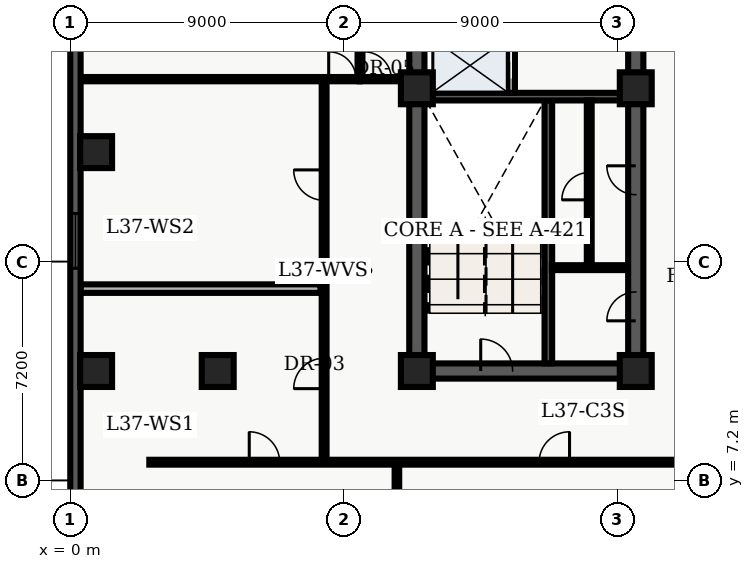
"""IFC4 building model, lengths in metres.
Left out: names, types, materials, properties, quantities, classifications, styles, units other than length and angle.
Written with IfcOpenShell. Run it as: python <this file> out.ifc"""

import sys

from ifc_helpers import new_model, entity, si_unit, converted_unit, direction, frame, origin_with_axes, origin_2d_with_axis, place, context, subcontext, project, spatial, polyline, rectangle, outline, extrude, element, fill, save


model = new_model("IFC4")
c1 = context("Model", 3, precision=1e-05, world=origin_with_axes(), true_north=direction((0.0, 1.0)))
c2 = subcontext(c1, "Body", "Model", "MODEL_VIEW")
j1 = project(units=[si_unit("LENGTHUNIT", "METRE"), converted_unit("PLANEANGLEUNIT", "DEGREE", entity("IfcPlaneAngleMeasure", 0.017), si_unit("PLANEANGLEUNIT", "RADIAN"), dimensions=[0, 0, 0, 0, 0, 0, 0])], contexts=[c1])
p1 = place(None, origin_with_axes())
s1 = spatial("IfcSite", under=j1, at=p1, CompositionType="ELEMENT")
p2 = place(p1, origin_with_axes())
s2 = spatial("IfcBuilding", under=s1, at=p2, CompositionType="ELEMENT")
p3 = place(p2, frame((0.0, 0.0, 152.4), z_axis=(0.0, 0.0, 1.0), x_axis=(1.0, 0.0, 0.0)))
s3 = spatial("IfcBuildingStorey", under=s2, at=p3, CompositionType="ELEMENT", Elevation=152.4)
p4 = place(p3, frame((11.4, 10.8, 0.0), z_axis=(0.0, 0.0, 1.0), x_axis=(0.0, 1.0, 0.0)))
e1 = element("IfcWall", 1, at=p4, inside=s3, PredefinedType="SHEAR", context=c2, shape_type="SweptSolid", body=[
    extrude(outline(polyline([(0.0, -0.25), (27.0, -0.25), (27.0, 0.25), (0.0, 0.25), (0.0, -0.25)])), origin_with_axes(), (0.0, 0.0, 1.0), 3.66),
])
p5 = place(p3, frame((11.4, 10.8, 0.0), z_axis=(0.0, 0.0, 1.0), x_axis=(1.0, 0.0, 0.0)))
e2 = element("IfcWall", 2, at=p5, inside=s3, PredefinedType="SHEAR", context=c2, shape_type="SweptSolid", body=[
    extrude(outline(polyline([(0.0, -0.25), (7.2, -0.25), (7.2, 0.25), (0.0, 0.25), (0.0, -0.25)])), origin_with_axes(), (0.0, 0.0, 1.0), 3.66),
])
p6 = place(p5, frame((2.625, 0.0, 0.0), z_axis=(0.0, 0.0, 1.0), x_axis=(1.0, 0.0, 0.0)))
e3 = element("IfcOpeningElement", 3, at=p6, cuts=e2, PredefinedType="OPENING", context=c2, shape_type="SweptSolid", body=[
    extrude(rectangle(XDim=1.05, YDim=0.52, at=origin_2d_with_axis()), origin_with_axes(), (0.0, 0.0, 1.0), 2.15),
])
p7 = place(p3, frame((18.6, 10.8, 0.0), z_axis=(0.0, 0.0, 1.0), x_axis=(0.0, 1.0, 0.0)))
e4 = element("IfcWall", 4, at=p7, inside=s3, PredefinedType="SHEAR", context=c2, shape_type="SweptSolid", body=[
    extrude(outline(polyline([(0.0, -0.25), (13.5, -0.25), (13.5, 0.25), (0.0, 0.25), (0.0, -0.25)])), origin_with_axes(), (0.0, 0.0, 1.0), 3.66),
])
p8 = place(p7, frame((11.125, 0.0, 0.0), z_axis=(0.0, 0.0, 1.0), x_axis=(1.0, 0.0, 0.0)))
e5 = element("IfcOpeningElement", 5, at=p8, cuts=e4, PredefinedType="OPENING", context=c2, shape_type="SweptSolid", body=[
    extrude(rectangle(XDim=1.05, YDim=0.52, at=origin_2d_with_axis()), origin_with_axes(), (0.0, 0.0, 1.0), 2.15),
])
p9 = place(p7, frame((2.125, 0.0, 0.0), z_axis=(0.0, 0.0, 1.0), x_axis=(1.0, 0.0, 0.0)))
e6 = element("IfcOpeningElement", 6, at=p9, cuts=e4, PredefinedType="OPENING", context=c2, shape_type="SweptSolid", body=[
    extrude(rectangle(XDim=0.95, YDim=0.52, at=origin_2d_with_axis()), origin_with_axes(), (0.0, 0.0, 1.0), 2.15),
])
p10 = place(p7, frame((6.275, 0.0, 0.0), z_axis=(0.0, 0.0, 1.0), x_axis=(1.0, 0.0, 0.0)))
e7 = element("IfcOpeningElement", 7, at=p10, cuts=e4, PredefinedType="OPENING", context=c2, shape_type="SweptSolid", body=[
    extrude(rectangle(XDim=0.95, YDim=0.52, at=origin_2d_with_axis()), origin_with_axes(), (0.0, 0.0, 1.0), 2.15),
])
p11 = place(p3, frame((15.725, 11.05, 0.0), z_axis=(0.0, 0.0, 1.0), x_axis=(0.0, 1.0, 0.0)))
e8 = element("IfcWall", 8, at=p11, inside=s3, PredefinedType="SHEAR", context=c2, shape_type="SweptSolid", body=[
    extrude(outline(polyline([(0.0, -0.125), (8.65, -0.125), (8.65, 0.125), (0.0, 0.125), (0.0, -0.125)])), origin_with_axes(), (0.0, 0.0, 1.0), 3.66),
])
p12 = place(p3, frame((11.65, 19.825, 0.0), z_axis=(0.0, 0.0, 1.0), x_axis=(1.0, 0.0, 0.0)))
e9 = element("IfcWall", 9, at=p12, inside=s3, PredefinedType="SHEAR", context=c2, shape_type="SweptSolid", body=[
    extrude(outline(polyline([(0.0, -0.125), (6.7, -0.125), (6.7, 0.125), (0.0, 0.125), (0.0, -0.125)])), origin_with_axes(), (0.0, 0.0, 1.0), 3.66),
])
p13 = place(p3, frame((14.5, 19.95, 0.0), z_axis=(0.0, 0.0, 1.0), x_axis=(0.0, 1.0, 0.0)))
e10 = element("IfcWall", 10, at=p13, inside=s3, PredefinedType="SOLIDWALL", context=c2, shape_type="SweptSolid", body=[
    extrude(outline(polyline([(0.0, -0.125), (6.25, -0.125), (6.25, 0.125), (0.0, 0.125), (0.0, -0.125)])), origin_with_axes(), (0.0, 0.0, 1.0), 2.7),
])
p14 = place(p13, frame((1.025, 0.0, 0.0), z_axis=(0.0, 0.0, 1.0), x_axis=(1.0, 0.0, 0.0)))
e11 = element("IfcOpeningElement", 11, at=p14, cuts=e10, PredefinedType="OPENING", context=c2, shape_type="SweptSolid", body=[
    extrude(rectangle(XDim=1.1, YDim=0.27, at=origin_2d_with_axis()), origin_with_axes(), (0.0, 0.0, 1.0), 2.15),
])
p15 = place(p13, frame((2.975, 0.0, 0.0), z_axis=(0.0, 0.0, 1.0), x_axis=(1.0, 0.0, 0.0)))
e12 = element("IfcOpeningElement", 12, at=p15, cuts=e10, PredefinedType="OPENING", context=c2, shape_type="SweptSolid", body=[
    extrude(rectangle(XDim=1.1, YDim=0.27, at=origin_2d_with_axis()), origin_with_axes(), (0.0, 0.0, 1.0), 2.15),
])
p16 = place(p13, frame((5.425, 0.0, 0.0), z_axis=(0.0, 0.0, 1.0), x_axis=(1.0, 0.0, 0.0)))
e13 = element("IfcOpeningElement", 13, at=p16, cuts=e10, PredefinedType="OPENING", context=c2, shape_type="SweptSolid", body=[
    extrude(rectangle(XDim=1.2, YDim=0.27, at=origin_2d_with_axis()), origin_with_axes(), (0.0, 0.0, 1.0), 2.15),
])
for number, where, z_axis, x_axis in (
    (14, (11.4, 10.8, 0.0), (0.0, 0.0, 1.0), (1.0, 0.0, 0.0)),
    (15, (11.4, 20.1, 0.0), (0.0, 0.0, 1.0), (1.0, 0.0, 0.0)),
    (16, (18.6, 10.8, 0.0), (0.0, 0.0, 1.0), (1.0, 0.0, 0.0)),
    (17, (18.6, 20.1, 0.0), (0.0, 0.0, 1.0), (1.0, 0.0, 0.0)),
    (18, (4.85, 10.8, 0.0), (0.0, 0.0, 1.0), (1.0, 0.0, 0.0)),
    (19, (0.85, 10.8, 0.0), (0.0, 0.0, 1.0), (1.0, 0.0, 0.0)),
    (20, (0.85, 18.0, 0.0), (0.0, 0.0, 1.0), (1.0, 0.0, 0.0)),
):
    element("IfcColumn", number, at=place(p3, frame(where, z_axis=z_axis, x_axis=x_axis)), inside=s3, PredefinedType="COLUMN", context=c2, shape_type="SweptSolid", body=[
        extrude(rectangle(XDim=1.05, YDim=1.05, at=origin_2d_with_axis()), origin_with_axes(), (0.0, 0.0, 1.0), 3.9),
    ])
p17 = place(p3, frame((15.84, 14.2, 0.0), z_axis=(0.0, 0.0, 1.0), x_axis=(1.0, 0.0, 0.0)))
e21 = element("IfcWall", 21, at=p17, inside=s3, PredefinedType="PARTITIONING", context=c2, shape_type="SweptSolid", body=[
    extrude(outline(polyline([(0.0, -0.08), (2.46, -0.08), (2.46, 0.08), (0.0, 0.08), (0.0, -0.08)])), origin_with_axes(), (0.0, 0.0, 1.0), 2.7),
])
p18 = place(p3, frame((17.07, 14.28, 0.0), z_axis=(0.0, 0.0, 1.0), x_axis=(0.0, 1.0, 0.0)))
e22 = element("IfcWall", 22, at=p18, inside=s3, PredefinedType="PARTITIONING", context=c2, shape_type="SweptSolid", body=[
    extrude(outline(polyline([(0.0, -0.08), (5.42, -0.08), (5.42, 0.08), (0.0, 0.08), (0.0, -0.08)])), origin_with_axes(), (0.0, 0.0, 1.0), 2.7),
])
p19 = place(p18, frame((2.6, 0.0, 0.0), z_axis=(0.0, 0.0, 1.0), x_axis=(1.0, 0.0, 0.0)))
e23 = element("IfcOpeningElement", 23, at=p19, cuts=e22, PredefinedType="OPENING", context=c2, shape_type="SweptSolid", body=[
    extrude(rectangle(XDim=0.9, YDim=0.18, at=origin_2d_with_axis()), origin_with_axes(), (0.0, 0.0, 1.0), 2.15),
])
p20 = place(p3, frame((9.52, 20.4, 0.0), z_axis=(0.0, 0.0, 1.0), x_axis=(0.0, 1.0, 0.0)))
e24 = element("IfcWall", 24, at=p20, inside=s3, PredefinedType="PARTITIONING", context=c2, shape_type="SweptSolid", body=[
    extrude(outline(polyline([(0.0, -0.07), (4.0, -0.07), (4.0, 0.07), (0.0, 0.07), (0.0, -0.07)])), origin_with_axes(), (0.0, 0.0, 1.0), 2.7),
])
p21 = place(p3, frame((9.52, 20.4, 0.0), z_axis=(0.0, 0.0, 1.0), x_axis=(1.0, 0.0, 0.0)))
e25 = element("IfcWall", 25, at=p21, inside=s3, PredefinedType="PARTITIONING", context=c2, shape_type="SweptSolid", body=[
    extrude(outline(polyline([(0.0, -0.07), (1.58, -0.07), (1.58, 0.07), (0.0, 0.07), (0.0, -0.07)])), origin_with_axes(), (0.0, 0.0, 1.0), 2.7),
])
p22 = place(p21, frame((0.59, 0.0, 0.0), z_axis=(0.0, 0.0, 1.0), x_axis=(1.0, 0.0, 0.0)))
e26 = element("IfcOpeningElement", 26, at=p22, cuts=e25, PredefinedType="OPENING", context=c2, shape_type="SweptSolid", body=[
    extrude(rectangle(XDim=0.9, YDim=0.16, at=origin_2d_with_axis()), origin_with_axes(), (0.0, 0.0, 1.0), 2.15),
])
p23 = place(p3, frame((2.6, 7.8, 0.0), z_axis=(0.0, 0.0, 1.0), x_axis=(1.0, 0.0, 0.0)))
e27 = element("IfcWall", 27, at=p23, inside=s3, PredefinedType="PARTITIONING", context=c2, shape_type="SweptSolid", body=[
    extrude(outline(polyline([(0.0, -0.08), (18.55, -0.08), (18.55, 0.08), (0.0, 0.08), (0.0, -0.08)])), origin_with_axes(), (0.0, 0.0, 1.0), 2.7),
])
p24 = place(p23, frame((3.787, 0.0, 0.0), z_axis=(0.0, 0.0, 1.0), x_axis=(1.0, 0.0, 0.0)))
e28 = element("IfcOpeningElement", 28, at=p24, cuts=e27, PredefinedType="OPENING", context=c2, shape_type="SweptSolid", body=[
    extrude(rectangle(XDim=1.0, YDim=0.18, at=origin_2d_with_axis()), origin_with_axes(), (0.0, 0.0, 1.0), 2.15),
])
p25 = place(p23, frame((13.322, 0.0, 0.0), z_axis=(0.0, 0.0, 1.0), x_axis=(1.0, 0.0, 0.0)))
e29 = element("IfcOpeningElement", 29, at=p25, cuts=e27, PredefinedType="OPENING", context=c2, shape_type="SweptSolid", body=[
    extrude(rectangle(XDim=1.0, YDim=0.18, at=origin_2d_with_axis()), origin_with_axes(), (0.0, 0.0, 1.0), 2.15),
])
p26 = place(p3, frame((8.35, 7.8, 0.0), z_axis=(0.0, 0.0, 1.0), x_axis=(0.0, 1.0, 0.0)))
e30 = element("IfcWall", 30, at=p26, inside=s3, PredefinedType="PARTITIONING", context=c2, shape_type="SweptSolid", body=[
    extrude(outline(polyline([(0.0, -0.08), (12.6, -0.08), (12.6, 0.08), (0.0, 0.08), (0.0, -0.08)])), origin_with_axes(), (0.0, 0.0, 1.0), 2.7),
])
p27 = place(p26, frame((2.92, 0.0, 0.0), z_axis=(0.0, 0.0, 1.0), x_axis=(1.0, 0.0, 0.0)))
e31 = element("IfcOpeningElement", 31, at=p27, cuts=e30, PredefinedType="OPENING", context=c2, shape_type="SweptSolid", body=[
    extrude(rectangle(XDim=1.0, YDim=0.18, at=origin_2d_with_axis()), origin_with_axes(), (0.0, 0.0, 1.0), 2.15),
])
p28 = place(p26, frame((9.115, 0.0, 0.0), z_axis=(0.0, 0.0, 1.0), x_axis=(1.0, 0.0, 0.0)))
e32 = element("IfcOpeningElement", 32, at=p28, cuts=e30, PredefinedType="OPENING", context=c2, shape_type="SweptSolid", body=[
    extrude(rectangle(XDim=1.0, YDim=0.18, at=origin_2d_with_axis()), origin_with_axes(), (0.0, 0.0, 1.0), 2.15),
])
p29 = place(p3, frame((0.335, 20.4, 0.0), z_axis=(0.0, 0.0, 1.0), x_axis=(1.0, 0.0, 0.0)))
e33 = element("IfcWall", 33, at=p29, inside=s3, PredefinedType="PARTITIONING", context=c2, shape_type="SweptSolid", body=[
    extrude(outline(polyline([(0.0, -0.07), (9.185, -0.07), (9.185, 0.07), (0.0, 0.07), (0.0, -0.07)])), origin_with_axes(), (0.0, 0.0, 1.0), 2.7),
])
p30 = place(p29, frame((8.615, 0.0, 0.0), z_axis=(0.0, 0.0, 1.0), x_axis=(1.0, 0.0, 0.0)))
e34 = element("IfcOpeningElement", 34, at=p30, cuts=e33, PredefinedType="OPENING", context=c2, shape_type="SweptSolid", body=[
    extrude(rectangle(XDim=0.9, YDim=0.16, at=origin_2d_with_axis()), origin_with_axes(), (0.0, 0.0, 1.0), 2.15),
])
p31 = place(p3, frame((0.335, 13.51, 0.0), z_axis=(0.0, 0.0, 1.0), x_axis=(1.0, 0.0, 0.0)))
e35 = element("IfcWall", 35, at=p31, inside=s3, PredefinedType="PARTITIONING", context=c2, shape_type="SweptSolid", body=[
    extrude(outline(polyline([(0.0, -0.14), (7.895, -0.14), (7.895, 0.14), (0.0, 0.14), (0.0, -0.14)])), origin_with_axes(), (0.0, 0.0, 1.0), 2.7),
])
p32 = place(p3, frame((10.744, 0.335, 0.0), z_axis=(0.0, 0.0, 1.0), x_axis=(0.0, 1.0, 0.0)))
e36 = element("IfcWall", 36, at=p32, inside=s3, PredefinedType="PARTITIONING", context=c2, shape_type="SweptSolid", body=[
    extrude(outline(polyline([(0.0, -0.075), (7.365, -0.075), (7.365, 0.075), (0.0, 0.075), (0.0, -0.075)])), origin_with_axes(), (0.0, 0.0, 1.0), 2.7),
])
p33 = place(p3, frame((0.17, 2.74, 0.0), z_axis=(0.0, 0.0, 1.0), x_axis=(0.0, 1.0, 0.0)))
e37 = element("IfcWall", 37, at=p33, inside=s3, PredefinedType="SOLIDWALL", context=c2, shape_type="SweptSolid", body=[
    extrude(outline(polyline([(0.0, -0.17), (43.46, -0.17), (43.46, 0.17), (0.0, 0.17), (0.0, -0.17)])), origin_with_axes(), (0.0, 0.0, 1.0), 3.66),
])
p34 = place(p33, frame((2.948, 0.0, 0.45), z_axis=(0.0, 0.0, 1.0), x_axis=(1.0, 0.0, 0.0)))
e38 = element("IfcOpeningElement", 38, at=p34, cuts=e37, PredefinedType="OPENING", context=c2, shape_type="SweptSolid", body=[
    extrude(rectangle(XDim=1.8, YDim=0.36, at=origin_2d_with_axis()), origin_with_axes(), (0.0, 0.0, 1.0), 2.1),
])
p35 = place(p33, frame((12.339, 0.0, 0.45), z_axis=(0.0, 0.0, 1.0), x_axis=(1.0, 0.0, 0.0)))
e39 = element("IfcOpeningElement", 39, at=p35, cuts=e37, PredefinedType="OPENING", context=c2, shape_type="SweptSolid", body=[
    extrude(rectangle(XDim=1.8, YDim=0.36, at=origin_2d_with_axis()), origin_with_axes(), (0.0, 0.0, 1.0), 2.1),
])
p36 = place(p33, frame((26.426, 0.0, 0.45), z_axis=(0.0, 0.0, 1.0), x_axis=(1.0, 0.0, 0.0)))
e40 = element("IfcOpeningElement", 40, at=p36, cuts=e37, PredefinedType="OPENING", context=c2, shape_type="SweptSolid", body=[
    extrude(rectangle(XDim=1.8, YDim=0.36, at=origin_2d_with_axis()), origin_with_axes(), (0.0, 0.0, 1.0), 2.1),
])
p37 = place(p33, frame((31.121, 0.0, 0.45), z_axis=(0.0, 0.0, 1.0), x_axis=(1.0, 0.0, 0.0)))
e41 = element("IfcOpeningElement", 41, at=p37, cuts=e37, PredefinedType="OPENING", context=c2, shape_type="SweptSolid", body=[
    extrude(rectangle(XDim=1.8, YDim=0.36, at=origin_2d_with_axis()), origin_with_axes(), (0.0, 0.0, 1.0), 2.1),
])
p38 = place(p33, frame((40.062, 0.0, 0.45), z_axis=(0.0, 0.0, 1.0), x_axis=(1.0, 0.0, 0.0)))
e42 = element("IfcOpeningElement", 42, at=p38, cuts=e37, PredefinedType="OPENING", context=c2, shape_type="SweptSolid", body=[
    extrude(rectangle(XDim=1.8, YDim=0.36, at=origin_2d_with_axis()), origin_with_axes(), (0.0, 0.0, 1.0), 2.1),
])
p39 = place(p13, frame((1.025, 0.0, 0.0), z_axis=(0.0, 0.0, 1.0), x_axis=(1.0, 0.0, 0.0)))
e43 = element("IfcDoor", 43, at=p39, inside=s3, OperationType="SLIDING_TO_LEFT", PredefinedType="DOOR", context=c2, shape_type="SweptSolid", body=[
    extrude(rectangle(XDim=1.1, YDim=0.09, at=origin_2d_with_axis()), origin_with_axes(), (0.0, 0.0, 1.0), 2.15),
])
fill(e11, e43)
p40 = place(p5, frame((2.625, 0.0, 0.0), z_axis=(0.0, 0.0, 1.0), x_axis=(1.0, 0.0, 0.0)))
e44 = element("IfcDoor", 44, at=p40, inside=s3, OperationType="SINGLE_SWING_LEFT", PredefinedType="DOOR", context=c2, shape_type="SweptSolid", body=[
    extrude(rectangle(XDim=1.05, YDim=0.09, at=origin_2d_with_axis()), origin_with_axes(), (0.0, 0.0, 1.0), 2.15),
])
fill(e3, e44)
p41 = place(p7, frame((2.125, 0.0, 0.0), z_axis=(0.0, 0.0, 1.0), x_axis=(1.0, 0.0, 0.0)))
e45 = element("IfcDoor", 45, at=p41, inside=s3, OperationType="SINGLE_SWING_LEFT", PredefinedType="DOOR", context=c2, shape_type="SweptSolid", body=[
    extrude(rectangle(XDim=0.95, YDim=0.09, at=origin_2d_with_axis()), origin_with_axes(), (0.0, 0.0, 1.0), 2.15),
])
fill(e6, e45)
p42 = place(p18, frame((2.6, 0.0, 0.0), z_axis=(0.0, 0.0, 1.0), x_axis=(1.0, 0.0, 0.0)))
e46 = element("IfcDoor", 46, at=p42, inside=s3, OperationType="SINGLE_SWING_LEFT", PredefinedType="DOOR", context=c2, shape_type="SweptSolid", body=[
    extrude(rectangle(XDim=0.9, YDim=0.09, at=origin_2d_with_axis()), origin_with_axes(), (0.0, 0.0, 1.0), 2.15),
])
fill(e23, e46)
p43 = place(p7, frame((6.275, 0.0, 0.0), z_axis=(0.0, 0.0, 1.0), x_axis=(1.0, 0.0, 0.0)))
e47 = element("IfcDoor", 47, at=p43, inside=s3, OperationType="SINGLE_SWING_RIGHT", PredefinedType="DOOR", context=c2, shape_type="SweptSolid", body=[
    extrude(rectangle(XDim=0.95, YDim=0.09, at=origin_2d_with_axis()), origin_with_axes(), (0.0, 0.0, 1.0), 2.15),
])
fill(e7, e47)
p44 = place(p21, frame((0.59, 0.0, 0.0), z_axis=(0.0, 0.0, 1.0), x_axis=(1.0, 0.0, 0.0)))
e48 = element("IfcDoor", 48, at=p44, inside=s3, OperationType="SINGLE_SWING_LEFT", PredefinedType="DOOR", context=c2, shape_type="SweptSolid", body=[
    extrude(rectangle(XDim=0.9, YDim=0.084, at=origin_2d_with_axis()), origin_with_axes(), (0.0, 0.0, 1.0), 2.15),
])
fill(e26, e48)
p45 = place(p29, frame((8.615, 0.0, 0.0), z_axis=(0.0, 0.0, 1.0), x_axis=(1.0, 0.0, 0.0)))
e49 = element("IfcDoor", 49, at=p45, inside=s3, OperationType="SINGLE_SWING_LEFT", PredefinedType="DOOR", context=c2, shape_type="SweptSolid", body=[
    extrude(rectangle(XDim=0.9, YDim=0.084, at=origin_2d_with_axis()), origin_with_axes(), (0.0, 0.0, 1.0), 2.15),
])
fill(e34, e49)
p46 = place(p26, frame((2.92, 0.0, 0.0), z_axis=(0.0, 0.0, 1.0), x_axis=(1.0, 0.0, 0.0)))
e50 = element("IfcDoor", 50, at=p46, inside=s3, OperationType="SINGLE_SWING_LEFT", PredefinedType="DOOR", context=c2, shape_type="SweptSolid", body=[
    extrude(rectangle(XDim=1.0, YDim=0.09, at=origin_2d_with_axis()), origin_with_axes(), (0.0, 0.0, 1.0), 2.15),
])
fill(e31, e50)
p47 = place(p26, frame((9.115, 0.0, 0.0), z_axis=(0.0, 0.0, 1.0), x_axis=(1.0, 0.0, 0.0)))
e51 = element("IfcDoor", 51, at=p47, inside=s3, OperationType="SINGLE_SWING_RIGHT", PredefinedType="DOOR", context=c2, shape_type="SweptSolid", body=[
    extrude(rectangle(XDim=1.0, YDim=0.09, at=origin_2d_with_axis()), origin_with_axes(), (0.0, 0.0, 1.0), 2.15),
])
fill(e32, e51)
p48 = place(p23, frame((3.787, 0.0, 0.0), z_axis=(0.0, 0.0, 1.0), x_axis=(1.0, 0.0, 0.0)))
e52 = element("IfcDoor", 52, at=p48, inside=s3, OperationType="SINGLE_SWING_LEFT", PredefinedType="DOOR", context=c2, shape_type="SweptSolid", body=[
    extrude(rectangle(XDim=1.0, YDim=0.09, at=origin_2d_with_axis()), origin_with_axes(), (0.0, 0.0, 1.0), 2.15),
])
fill(e28, e52)
p49 = place(p23, frame((13.322, 0.0, 0.0), z_axis=(0.0, 0.0, 1.0), x_axis=(1.0, 0.0, 0.0)))
e53 = element("IfcDoor", 53, at=p49, inside=s3, OperationType="SINGLE_SWING_RIGHT", PredefinedType="DOOR", context=c2, shape_type="SweptSolid", body=[
    extrude(rectangle(XDim=1.0, YDim=0.09, at=origin_2d_with_axis()), origin_with_axes(), (0.0, 0.0, 1.0), 2.15),
])
fill(e29, e53)
p50 = place(p33, frame((12.339, 0.0, 0.45), z_axis=(0.0, 0.0, 1.0), x_axis=(1.0, 0.0, 0.0)))
e54 = element("IfcWindow", 54, at=p50, inside=s3, PredefinedType="WINDOW", context=c2, shape_type="SweptSolid", body=[
    extrude(rectangle(XDim=1.8, YDim=0.09, at=origin_2d_with_axis()), origin_with_axes(), (0.0, 0.0, 1.0), 2.1),
])
fill(e39, e54)
save(model, sys.argv[1])
